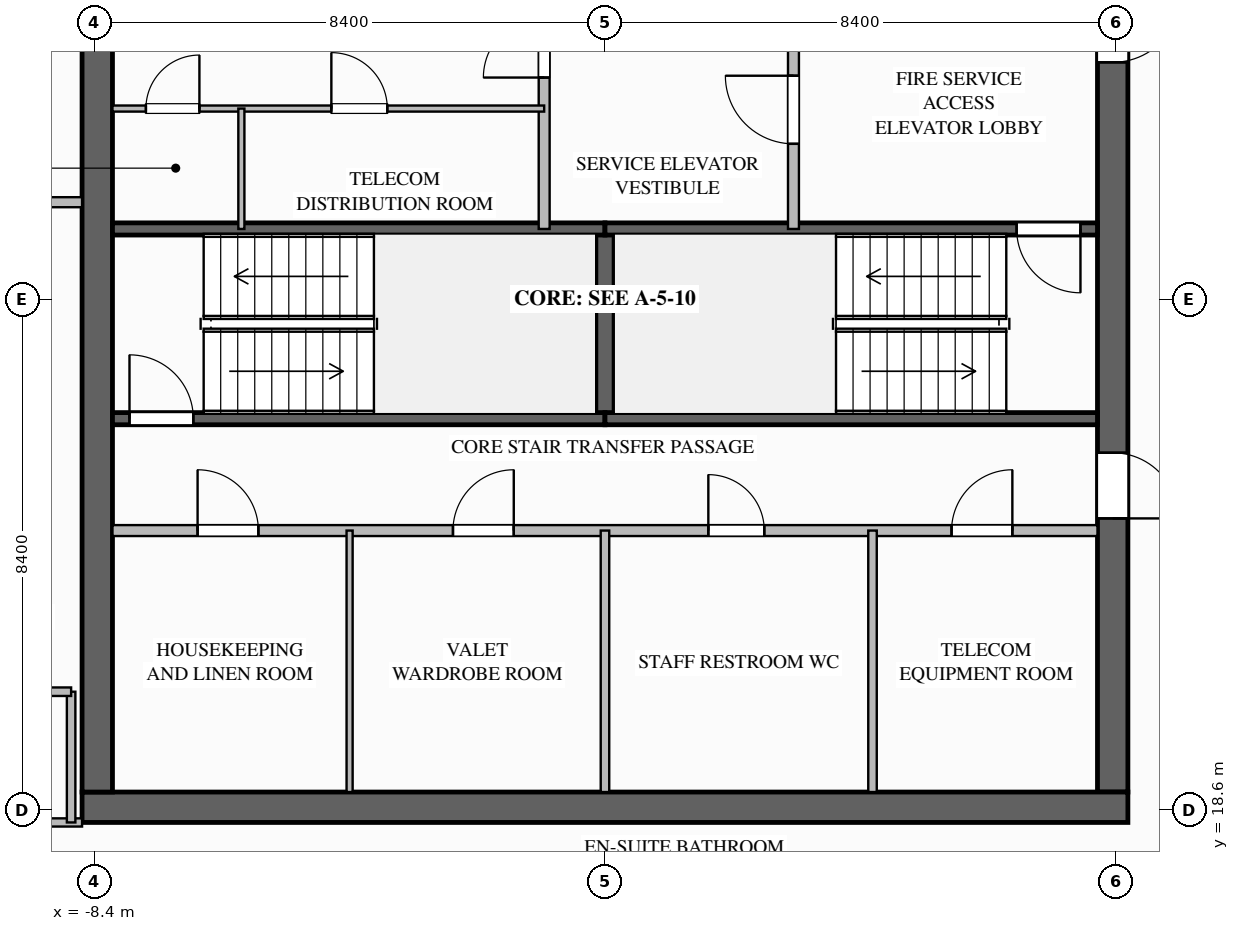
"""IFC4 building model, lengths in metres.
Left out: names, types, materials, properties, quantities, classifications, styles, units other than length and angle.
Written with IfcOpenShell. Run it as: python <this file> out.ifc"""

import sys

from ifc_helpers import new_model, si_unit, direction, frame, frame_2d, origin, place, context, subcontext, project, spatial, rectangle, extrude, element, fill, save


model = new_model("IFC4")
c1 = context("Model", 3, precision=1e-05, world=origin(), true_north=direction((0.0, 1.0)))
c2 = subcontext(c1, "Body", "Model", "MODEL_VIEW")
j1 = project(units=[si_unit("LENGTHUNIT", "METRE"), si_unit("PLANEANGLEUNIT", "RADIAN")], contexts=[c1])
p1 = place(None, origin())
s1 = spatial("IfcSite", under=j1, at=p1, CompositionType="ELEMENT")
p2 = place(p1, origin())
s2 = spatial("IfcBuilding", under=s1, at=p2, CompositionType="ELEMENT")
p3 = place(p2, frame((0.0, 0.0, 248.3)))
s3 = spatial("IfcBuildingStorey", under=s2, at=p3, CompositionType="ELEMENT", Elevation=248.3)
p4 = place(p3, frame((8.35, 35.1, 0.0), z_axis=(0.0, 0.0, 1.0), x_axis=(0.0, -1.0, 0.0)))
e1 = element("IfcWall", 1, at=p4, inside=s3, PredefinedType="SHEAR", context=c2, shape_type="SweptSolid", body=[
    extrude(rectangle(XDim=16.2, YDim=0.5, at=frame_2d((8.1, 0.0))), origin(), (0.0, 0.0, 1.0), 3.6),
])
p5 = place(p4, frame((3.08, 0.0, 0.0)))
e2 = element("IfcOpeningElement", 2, at=p5, cuts=e1, PredefinedType="OPENING", context=c2, shape_type="SweptSolid", body=[
    extrude(rectangle(XDim=1.12, YDim=2.1, at=frame_2d((0.56, 1.05))), frame((0.0, 0.26, 0.0), z_axis=(0.0, -1.0, 0.0), x_axis=(1.0, 0.0, 0.0)), (0.0, 0.0, 1.0), 0.52),
])
p6 = place(p4, frame((10.62, 0.0, 0.0)))
e3 = element("IfcOpeningElement", 3, at=p6, cuts=e1, PredefinedType="OPENING", context=c2, shape_type="SweptSolid", body=[
    extrude(rectangle(XDim=1.08, YDim=2.04, at=frame_2d((0.54, 1.02))), frame((0.0, 0.26, 0.0), z_axis=(0.0, -1.0, 0.0), x_axis=(1.0, 0.0, 0.0)), (0.0, 0.0, 1.0), 0.52),
])
p7 = place(p3, frame((8.6, 18.65, 0.0), z_axis=(0.0, 0.0, 1.0), x_axis=(-1.0, 0.0, 0.0)))
e4 = element("IfcWall", 4, at=p7, inside=s3, PredefinedType="SHEAR", context=c2, shape_type="SweptSolid", body=[
    extrude(rectangle(XDim=17.2, YDim=0.5, at=frame_2d((8.6, 0.0))), origin(), (0.0, 0.0, 1.0), 3.6),
])
p8 = place(p3, frame((-8.35, 18.9, 0.0), z_axis=(0.0, 0.0, 1.0), x_axis=(0.0, 1.0, 0.0)))
e5 = element("IfcWall", 5, at=p8, inside=s3, PredefinedType="SHEAR", context=c2, shape_type="SweptSolid", body=[
    extrude(rectangle(XDim=16.2, YDim=0.5, at=frame_2d((8.1, 0.0))), origin(), (0.0, 0.0, 1.0), 3.6),
])
p9 = place(p3, frame((0.0, 25.04, 0.0), z_axis=(0.0, 0.0, 1.0), x_axis=(0.0, 1.0, 0.0)))
e6 = element("IfcWall", 6, at=p9, inside=s3, PredefinedType="SOLIDWALL", context=c2, shape_type="SweptSolid", body=[
    extrude(rectangle(XDim=3.12, YDim=0.3, at=frame_2d((1.56, 0.0))), origin(), (0.0, 0.0, 1.0), 3.34),
])
p10 = place(p3, frame((-8.1, 25.04, 0.0), z_axis=(0.0, 0.0, 1.0), x_axis=(1.0, 0.0, 0.0)))
e7 = element("IfcWall", 7, at=p10, inside=s3, PredefinedType="SOLIDWALL", context=c2, shape_type="SweptSolid", body=[
    extrude(rectangle(XDim=8.1, YDim=0.2, at=frame_2d((4.05, 0.0))), origin(), (0.0, 0.0, 1.0), 3.34),
])
p11 = place(p10, frame((0.28, 0.0, 0.0)))
e8 = element("IfcOpeningElement", 8, at=p11, cuts=e7, PredefinedType="OPENING", context=c2, shape_type="SweptSolid", body=[
    extrude(rectangle(XDim=1.05, YDim=2.1, at=frame_2d((0.525, 1.05))), frame((0.0, 0.11, 0.0), z_axis=(0.0, -1.0, 0.0), x_axis=(1.0, 0.0, 0.0)), (0.0, 0.0, 1.0), 0.22),
])
for number, where, z_axis, x_axis in (
    (9, (-8.1, 28.16, 0.0), (0.0, 0.0, 1.0), (1.0, 0.0, 0.0)),
    (10, (0.0, 25.04, 0.0), (0.0, 0.0, 1.0), (1.0, 0.0, 0.0)),
):
    element("IfcWall", number, at=place(p3, frame(where, z_axis=z_axis, x_axis=x_axis)), inside=s3, PredefinedType="SOLIDWALL", context=c2, shape_type="SweptSolid", body=[
        extrude(rectangle(XDim=8.1, YDim=0.2, at=frame_2d((4.05, 0.0))), origin(), (0.0, 0.0, 1.0), 3.34),
    ])
p12 = place(p3, frame((8.1, 28.16, 0.0), z_axis=(0.0, 0.0, 1.0), x_axis=(-1.0, 0.0, 0.0)))
e11 = element("IfcWall", 11, at=p12, inside=s3, PredefinedType="SOLIDWALL", context=c2, shape_type="SweptSolid", body=[
    extrude(rectangle(XDim=8.1, YDim=0.2, at=frame_2d((4.05, 0.0))), origin(), (0.0, 0.0, 1.0), 3.34),
])
p13 = place(p12, frame((0.28, 0.0, 0.0)))
e12 = element("IfcOpeningElement", 12, at=p13, cuts=e11, PredefinedType="OPENING", context=c2, shape_type="SweptSolid", body=[
    extrude(rectangle(XDim=1.05, YDim=2.1, at=frame_2d((0.525, 1.05))), frame((0.0, 0.11, 0.0), z_axis=(0.0, -1.0, 0.0), x_axis=(1.0, 0.0, 0.0)), (0.0, 0.0, 1.0), 0.22),
])
p14 = place(p3, frame((3.1, 28.16, 0.0), z_axis=(0.0, 0.0, 1.0), x_axis=(0.0, 1.0, 0.0)))
e13 = element("IfcWall", 13, at=p14, inside=s3, PredefinedType="SOLIDWALL", context=c2, shape_type="SweptSolid", body=[
    extrude(rectangle(XDim=4.06, YDim=0.18, at=frame_2d((2.03, 0.0))), origin(), (0.0, 0.0, 1.0), 3.34),
])
p15 = place(p14, frame((1.4, 0.0, 0.0)))
e14 = element("IfcOpeningElement", 14, at=p15, cuts=e13, PredefinedType="OPENING", context=c2, shape_type="SweptSolid", body=[
    extrude(rectangle(XDim=1.12, YDim=2.1, at=frame_2d((0.56, 1.05))), frame((0.0, 0.1, 0.0), z_axis=(0.0, -1.0, 0.0), x_axis=(1.0, 0.0, 0.0)), (0.0, 0.0, 1.0), 0.2),
])
p16 = place(p3, frame((-1.0, 28.16, 0.0), z_axis=(0.0, 0.0, 1.0), x_axis=(0.0, 1.0, 0.0)))
e15 = element("IfcWall", 15, at=p16, inside=s3, PredefinedType="SOLIDWALL", context=c2, shape_type="SweptSolid", body=[
    extrude(rectangle(XDim=4.02, YDim=0.18, at=frame_2d((2.01, 0.0))), origin(), (0.0, 0.0, 1.0), 3.34),
])
p17 = place(p16, frame((2.49, 0.0, 0.0)))
e16 = element("IfcOpeningElement", 16, at=p17, cuts=e15, PredefinedType="OPENING", context=c2, shape_type="SweptSolid", body=[
    extrude(rectangle(XDim=1.0, YDim=2.1, at=frame_2d((0.5, 1.05))), frame((0.0, 0.1, 0.0), z_axis=(0.0, -1.0, 0.0), x_axis=(1.0, 0.0, 0.0)), (0.0, 0.0, 1.0), 0.2),
])
p18 = place(p3, frame((-8.1, 30.14, 0.0), z_axis=(0.0, 0.0, 1.0), x_axis=(1.0, 0.0, 0.0)))
e17 = element("IfcWall", 17, at=p18, inside=s3, PredefinedType="PARTITIONING", context=c2, shape_type="SweptSolid", body=[
    extrude(rectangle(XDim=7.1, YDim=0.1, at=frame_2d((3.55, 0.0))), origin(), (0.0, 0.0, 1.0), 3.34),
])
p19 = place(p18, frame((0.55, 0.0, 0.0)))
e18 = element("IfcOpeningElement", 18, at=p19, cuts=e17, PredefinedType="OPENING", context=c2, shape_type="SweptSolid", body=[
    extrude(rectangle(XDim=0.88, YDim=2.1, at=frame_2d((0.44, 1.05))), frame((0.0, 0.06, 0.0), z_axis=(0.0, -1.0, 0.0), x_axis=(1.0, 0.0, 0.0)), (0.0, 0.0, 1.0), 0.12),
])
p20 = place(p18, frame((3.6, 0.0, 0.0)))
e19 = element("IfcOpeningElement", 19, at=p20, cuts=e17, PredefinedType="OPENING", context=c2, shape_type="SweptSolid", body=[
    extrude(rectangle(XDim=0.92, YDim=2.1, at=frame_2d((0.46, 1.05))), frame((0.0, 0.06, 0.0), z_axis=(0.0, -1.0, 0.0), x_axis=(1.0, 0.0, 0.0)), (0.0, 0.0, 1.0), 0.12),
])
p21 = place(p3, frame((-5.98, 28.16, 0.0), z_axis=(0.0, 0.0, 1.0), x_axis=(0.0, 1.0, 0.0)))
e20 = element("IfcWall", 20, at=p21, inside=s3, PredefinedType="PARTITIONING", context=c2, shape_type="SweptSolid", body=[
    extrude(rectangle(XDim=1.98, YDim=0.1, at=frame_2d((0.99, 0.0))), origin(), (0.0, 0.0, 1.0), 3.34),
])
p22 = place(p3, frame((-8.1, 23.2, 0.0), z_axis=(0.0, 0.0, 1.0), x_axis=(1.0, 0.0, 0.0)))
e21 = element("IfcWall", 21, at=p22, inside=s3, PredefinedType="SOLIDWALL", context=c2, shape_type="SweptSolid", body=[
    extrude(rectangle(XDim=16.2, YDim=0.18, at=frame_2d((8.1, 0.0))), origin(), (0.0, 0.0, 1.0), 3.34),
])
p23 = place(p22, frame((1.4, 0.0, 0.0)))
e22 = element("IfcOpeningElement", 22, at=p23, cuts=e21, PredefinedType="OPENING", context=c2, shape_type="SweptSolid", body=[
    extrude(rectangle(XDim=1.0, YDim=2.1, at=frame_2d((0.5, 1.05))), frame((0.0, 0.1, 0.0), z_axis=(0.0, -1.0, 0.0), x_axis=(1.0, 0.0, 0.0)), (0.0, 0.0, 1.0), 0.2),
])
p24 = place(p22, frame((5.6, 0.0, 0.0)))
e23 = element("IfcOpeningElement", 23, at=p24, cuts=e21, PredefinedType="OPENING", context=c2, shape_type="SweptSolid", body=[
    extrude(rectangle(XDim=1.0, YDim=2.1, at=frame_2d((0.5, 1.05))), frame((0.0, 0.1, 0.0), z_axis=(0.0, -1.0, 0.0), x_axis=(1.0, 0.0, 0.0)), (0.0, 0.0, 1.0), 0.2),
])
p25 = place(p22, frame((9.8, 0.0, 0.0)))
e24 = element("IfcOpeningElement", 24, at=p25, cuts=e21, PredefinedType="OPENING", context=c2, shape_type="SweptSolid", body=[
    extrude(rectangle(XDim=0.92, YDim=2.1, at=frame_2d((0.46, 1.05))), frame((0.0, 0.1, 0.0), z_axis=(0.0, -1.0, 0.0), x_axis=(1.0, 0.0, 0.0)), (0.0, 0.0, 1.0), 0.2),
])
p26 = place(p22, frame((13.8, 0.0, 0.0)))
e25 = element("IfcOpeningElement", 25, at=p26, cuts=e21, PredefinedType="OPENING", context=c2, shape_type="SweptSolid", body=[
    extrude(rectangle(XDim=1.0, YDim=2.1, at=frame_2d((0.5, 1.05))), frame((0.0, 0.1, 0.0), z_axis=(0.0, -1.0, 0.0), x_axis=(1.0, 0.0, 0.0)), (0.0, 0.0, 1.0), 0.2),
])
p27 = place(p3, frame((-4.2, 18.9, 0.0), z_axis=(0.0, 0.0, 1.0), x_axis=(0.0, 1.0, 0.0)))
e26 = element("IfcWall", 26, at=p27, inside=s3, PredefinedType="PARTITIONING", context=c2, shape_type="SweptSolid", body=[
    extrude(rectangle(XDim=4.3, YDim=0.1, at=frame_2d((2.15, 0.0))), origin(), (0.0, 0.0, 1.0), 3.34),
])
for number, where, z_axis, x_axis in (
    (27, (0.0, 18.9, 0.0), (0.0, 0.0, 1.0), (0.0, 1.0, 0.0)),
    (28, (4.4, 18.9, 0.0), (0.0, 0.0, 1.0), (0.0, 1.0, 0.0)),
):
    element("IfcWall", number, at=place(p3, frame(where, z_axis=z_axis, x_axis=x_axis)), inside=s3, PredefinedType="PLUMBINGWALL", context=c2, shape_type="SweptSolid", body=[
        extrude(rectangle(XDim=4.3, YDim=0.14, at=frame_2d((2.15, 0.0))), origin(), (0.0, 0.0, 1.0), 3.34),
    ])
p28 = place(p3, frame((-16.2, 18.4, 0.0), z_axis=(0.0, 0.0, 1.0), x_axis=(1.0, 0.0, 0.0)))
e29 = element("IfcWall", 29, at=p28, inside=s3, PredefinedType="PARTITIONING", context=c2, shape_type="SweptSolid", body=[
    extrude(rectangle(XDim=7.6, YDim=0.135, at=frame_2d((3.8, 0.0))), origin(), (0.0, 0.0, 1.0), 2.717),
])
p29 = place(p28, frame((2.155, 0.0, 0.0)))
e30 = element("IfcOpeningElement", 30, at=p29, cuts=e29, PredefinedType="OPENING", context=c2, shape_type="SweptSolid", body=[
    extrude(rectangle(XDim=1.26, YDim=2.2, at=frame_2d((0.63, 1.1))), frame((0.0, 0.077, 0.0), z_axis=(0.0, -1.0, 0.0), x_axis=(1.0, 0.0, 0.0)), (0.0, 0.0, 1.0), 0.155),
])
p30 = place(p3, frame((-21.4, 28.6, 0.0), z_axis=(0.0, 0.0, 1.0), x_axis=(1.0, 0.0, 0.0)))
e31 = element("IfcWall", 31, at=p30, inside=s3, PredefinedType="PARTITIONING", context=c2, shape_type="SweptSolid", body=[
    extrude(rectangle(XDim=12.8, YDim=0.165, at=frame_2d((6.4, 0.0))), origin(), (0.0, 0.0, 1.0), 3.34),
])
p31 = place(p3, frame((-8.78, 18.4, 0.0), z_axis=(0.0, 0.0, 1.0), x_axis=(0.0, 1.0, 0.0)))
e32 = element("IfcWall", 32, at=p31, inside=s3, PredefinedType="PLUMBINGWALL", context=c2, shape_type="SweptSolid", body=[
    extrude(rectangle(XDim=2.15, YDim=0.14, at=frame_2d((1.075, 0.0))), origin(), (0.0, 0.0, 1.0), 3.34),
])
p32 = place(p3, frame((-11.03, 20.55, 0.0), z_axis=(0.0, 0.0, 1.0), x_axis=(1.0, 0.0, 0.0)))
e33 = element("IfcWall", 33, at=p32, inside=s3, PredefinedType="PLUMBINGWALL", context=c2, shape_type="SweptSolid", body=[
    extrude(rectangle(XDim=2.25, YDim=0.14, at=frame_2d((1.125, 0.0))), origin(), (0.0, 0.0, 1.0), 3.34),
])
p33 = place(p32, frame((0.685, 0.0, 0.0)))
e34 = element("IfcOpeningElement", 34, at=p33, cuts=e33, PredefinedType="OPENING", context=c2, shape_type="SweptSolid", body=[
    extrude(rectangle(XDim=0.88, YDim=2.1, at=frame_2d((0.44, 1.05))), frame((0.0, 0.08, 0.0), z_axis=(0.0, -1.0, 0.0), x_axis=(1.0, 0.0, 0.0)), (0.0, 0.0, 1.0), 0.16),
])
p34 = place(p11, origin())
e35 = element("IfcDoor", 35, at=p34, inside=s3, OperationType="SINGLE_SWING_LEFT", PredefinedType="DOOR", context=c2, shape_type="SweptSolid", body=[
    extrude(rectangle(XDim=1.05, YDim=2.1, at=frame_2d((0.525, 1.05))), frame((0.0, 0.025, 0.0), z_axis=(0.0, -1.0, 0.0), x_axis=(1.0, 0.0, 0.0)), (0.0, 0.0, 1.0), 0.05),
])
fill(e8, e35)
p35 = place(p13, origin())
e36 = element("IfcDoor", 36, at=p35, inside=s3, OperationType="SINGLE_SWING_LEFT", PredefinedType="DOOR", context=c2, shape_type="SweptSolid", body=[
    extrude(rectangle(XDim=1.05, YDim=2.1, at=frame_2d((0.525, 1.05))), frame((0.0, 0.025, 0.0), z_axis=(0.0, -1.0, 0.0), x_axis=(1.0, 0.0, 0.0)), (0.0, 0.0, 1.0), 0.05),
])
fill(e12, e36)
p36 = place(p15, origin())
e37 = element("IfcDoor", 37, at=p36, inside=s3, OperationType="SINGLE_SWING_RIGHT", PredefinedType="DOOR", context=c2, shape_type="SweptSolid", body=[
    extrude(rectangle(XDim=1.12, YDim=2.1, at=frame_2d((0.56, 1.05))), frame((0.0, 0.025, 0.0), z_axis=(0.0, -1.0, 0.0), x_axis=(1.0, 0.0, 0.0)), (0.0, 0.0, 1.0), 0.05),
])
fill(e14, e37)
p37 = place(p5, origin())
e38 = element("IfcDoor", 38, at=p37, inside=s3, OperationType="SINGLE_SWING_LEFT", PredefinedType="DOOR", context=c2, shape_type="SweptSolid", body=[
    extrude(rectangle(XDim=1.12, YDim=2.1, at=frame_2d((0.56, 1.05))), frame((0.0, 0.025, 0.0), z_axis=(0.0, -1.0, 0.0), x_axis=(1.0, 0.0, 0.0)), (0.0, 0.0, 1.0), 0.05),
])
fill(e2, e38)
p38 = place(p17, origin())
e39 = element("IfcDoor", 39, at=p38, inside=s3, OperationType="SINGLE_SWING_LEFT", PredefinedType="DOOR", context=c2, shape_type="SweptSolid", body=[
    extrude(rectangle(XDim=1.0, YDim=2.1, at=frame_2d((0.5, 1.05))), frame((0.0, 0.025, 0.0), z_axis=(0.0, -1.0, 0.0), x_axis=(1.0, 0.0, 0.0)), (0.0, 0.0, 1.0), 0.05),
])
fill(e16, e39)
p39 = place(p19, origin())
e40 = element("IfcDoor", 40, at=p39, inside=s3, OperationType="SINGLE_SWING_RIGHT", PredefinedType="DOOR", context=c2, shape_type="SweptSolid", body=[
    extrude(rectangle(XDim=0.88, YDim=2.1, at=frame_2d((0.44, 1.05))), frame((0.0, 0.025, 0.0), z_axis=(0.0, -1.0, 0.0), x_axis=(1.0, 0.0, 0.0)), (0.0, 0.0, 1.0), 0.05),
])
fill(e18, e40)
p40 = place(p20, origin())
e41 = element("IfcDoor", 41, at=p40, inside=s3, OperationType="SINGLE_SWING_LEFT", PredefinedType="DOOR", context=c2, shape_type="SweptSolid", body=[
    extrude(rectangle(XDim=0.92, YDim=2.1, at=frame_2d((0.46, 1.05))), frame((0.0, 0.025, 0.0), z_axis=(0.0, -1.0, 0.0), x_axis=(1.0, 0.0, 0.0)), (0.0, 0.0, 1.0), 0.05),
])
fill(e19, e41)
p41 = place(p6, origin())
e42 = element("IfcDoor", 42, at=p41, inside=s3, OperationType="SINGLE_SWING_RIGHT", PredefinedType="DOOR", context=c2, shape_type="SweptSolid", body=[
    extrude(rectangle(XDim=1.08, YDim=2.04, at=frame_2d((0.54, 1.02))), frame((0.0, 0.025, 0.0), z_axis=(0.0, -1.0, 0.0), x_axis=(1.0, 0.0, 0.0)), (0.0, 0.0, 1.0), 0.05),
])
fill(e3, e42)
p42 = place(p23, origin())
e43 = element("IfcDoor", 43, at=p42, inside=s3, OperationType="SINGLE_SWING_LEFT", PredefinedType="DOOR", context=c2, shape_type="SweptSolid", body=[
    extrude(rectangle(XDim=1.0, YDim=2.1, at=frame_2d((0.5, 1.05))), frame((0.0, 0.025, 0.0), z_axis=(0.0, -1.0, 0.0), x_axis=(1.0, 0.0, 0.0)), (0.0, 0.0, 1.0), 0.05),
])
fill(e22, e43)
p43 = place(p24, origin())
e44 = element("IfcDoor", 44, at=p43, inside=s3, OperationType="SINGLE_SWING_RIGHT", PredefinedType="DOOR", context=c2, shape_type="SweptSolid", body=[
    extrude(rectangle(XDim=1.0, YDim=2.1, at=frame_2d((0.5, 1.05))), frame((0.0, 0.025, 0.0), z_axis=(0.0, -1.0, 0.0), x_axis=(1.0, 0.0, 0.0)), (0.0, 0.0, 1.0), 0.05),
])
fill(e23, e44)
p44 = place(p25, origin())
e45 = element("IfcDoor", 45, at=p44, inside=s3, OperationType="SINGLE_SWING_LEFT", PredefinedType="DOOR", context=c2, shape_type="SweptSolid", body=[
    extrude(rectangle(XDim=0.92, YDim=2.1, at=frame_2d((0.46, 1.05))), frame((0.0, 0.025, 0.0), z_axis=(0.0, -1.0, 0.0), x_axis=(1.0, 0.0, 0.0)), (0.0, 0.0, 1.0), 0.05),
])
fill(e24, e45)
p45 = place(p26, origin())
e46 = element("IfcDoor", 46, at=p45, inside=s3, OperationType="SINGLE_SWING_RIGHT", PredefinedType="DOOR", context=c2, shape_type="SweptSolid", body=[
    extrude(rectangle(XDim=1.0, YDim=2.1, at=frame_2d((0.5, 1.05))), frame((0.0, 0.025, 0.0), z_axis=(0.0, -1.0, 0.0), x_axis=(1.0, 0.0, 0.0)), (0.0, 0.0, 1.0), 0.05),
])
fill(e25, e46)
save(model, sys.argv[1])
